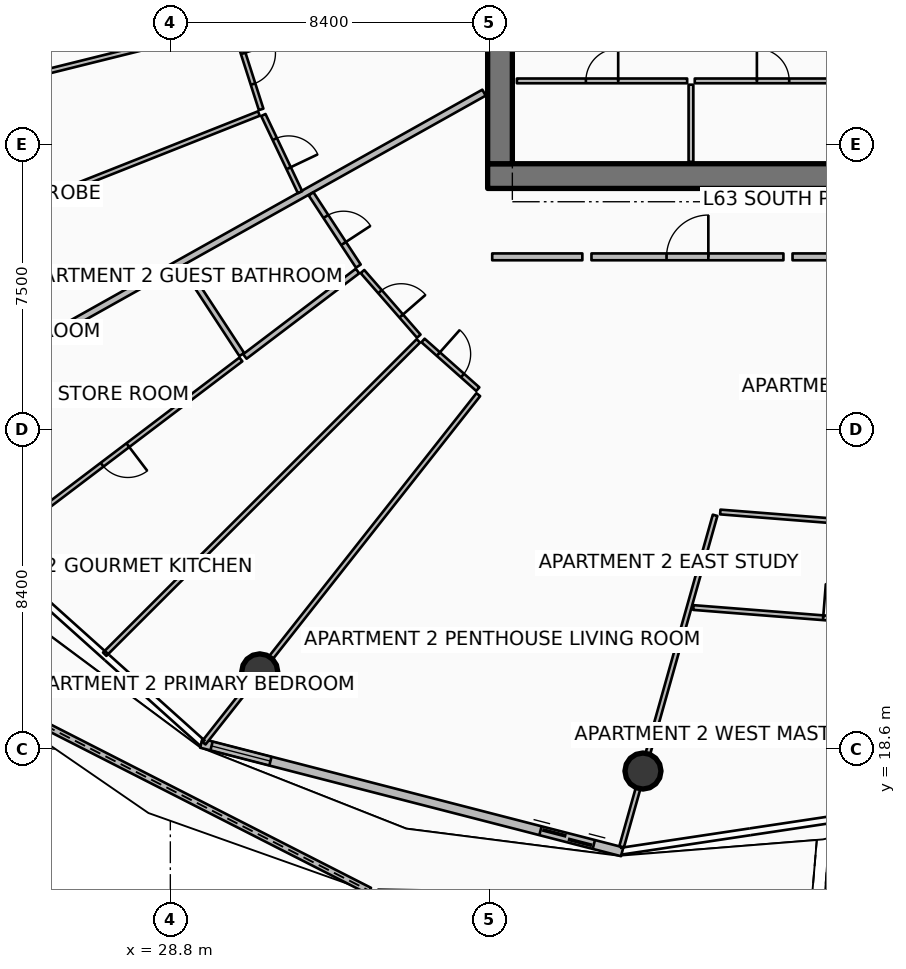
"""IFC4 building model, lengths in metres.
Left out: names, types, materials, properties, quantities, classifications, styles, units other than length and angle.
Written with IfcOpenShell. Run it as: python <this file> out.ifc"""

import sys

from ifc_helpers import new_model, si_unit, direction, frame, frame_2d, origin, origin_2d, place, context, subcontext, project, spatial, polyline, rectangle, circle, outline, extrude, element, fill, save


model = new_model("IFC4")
c1 = context("Model", 3, precision=1e-05, world=origin(), true_north=direction((0.0, 1.0)))
c2 = subcontext(c1, "Body", "Model", "MODEL_VIEW")
j1 = project(units=[si_unit("LENGTHUNIT", "METRE"), si_unit("PLANEANGLEUNIT", "RADIAN")], contexts=[c1])
p1 = place(None, origin())
s1 = spatial("IfcSite", under=j1, at=p1, CompositionType="ELEMENT")
p2 = place(p1, origin())
s2 = spatial("IfcBuilding", under=s1, at=p2, CompositionType="ELEMENT")
p3 = place(p2, frame((0.0, 0.0, 252.1)))
s3 = spatial("IfcBuildingStorey", under=s2, at=p3, CompositionType="ELEMENT", Elevation=252.1)
p4 = place(p3, frame((37.15, 33.675, 0.0), z_axis=(0.0, 0.0, 1.0), x_axis=(1.0, 0.0, 0.0)))
e1 = element("IfcWall", 1, at=p4, inside=s3, PredefinedType="SHEAR", context=c2, shape_type="SweptSolid", body=[
    extrude(rectangle(XDim=9.75, YDim=0.65, at=frame_2d((4.875, 0.0))), origin(), (0.0, 0.0, 1.0), 3.85),
])
p5 = place(p3, frame((37.475, 34.0, 0.0), z_axis=(0.0, 0.0, 1.0), x_axis=(0.0, 1.0, 0.0)))
e2 = element("IfcWall", 2, at=p5, inside=s3, PredefinedType="SHEAR", context=c2, shape_type="SweptSolid", body=[
    extrude(rectangle(XDim=16.0, YDim=0.65, at=frame_2d((8.0, 0.0))), origin(), (0.0, 0.0, 1.0), 3.85),
])
for number, where, z_axis, x_axis in (
    (3, (31.153, 20.629, 0.0), (0.0, 0.0, 1.0), (1.0, 0.0, 0.0)),
    (4, (41.237, 18.021, 0.0), (0.0, 0.0, 1.0), (1.0, 0.0, 0.0)),
):
    element("IfcColumn", number, at=place(p3, frame(where, z_axis=z_axis, x_axis=x_axis)), inside=s3, PredefinedType="COLUMN", context=c2, shape_type="SweptSolid", body=[
        extrude(circle(Radius=0.475, at=origin_2d()), origin(), (0.0, 0.0, 1.0), 3.59),
    ])
p6 = place(p3, frame((23.083, 20.454, 0.0), z_axis=(0.0, 0.0, 1.0), x_axis=(0.890886303028, -0.454226369861, 0.0)))
e5 = element("IfcWall", 5, at=p6, inside=s3, PredefinedType="PARAPET", context=c2, shape_type="SweptSolid", body=[
    extrude(outline(polyline([(0.0, 0.0), (12.3, 0.0), (12.3, 1.348), (6.15, 1.562), (0.0, 1.747), (0.0, 0.0)])), frame((0.0, 0.09, 0.0), z_axis=(0.0, -1.0, 0.0), x_axis=(1.0, 0.0, 0.0)), (0.0, 0.0, 1.0), 0.18),
])
p7 = place(p3, frame((46.017, 14.673, 0.0), z_axis=(0.0, 0.0, 1.0), x_axis=(0.976130464401, 0.217184982143, 0.0)))
e6 = element("IfcWall", 6, at=p7, inside=s3, PredefinedType="PARAPET", context=c2, shape_type="SweptSolid", body=[
    extrude(outline(polyline([(0.0, 0.0), (10.258, 0.0), (10.257, 1.348), (5.129, 1.182), (0.0, 1.12), (0.0, 0.0)])), frame((0.0, 0.09, 0.0), z_axis=(0.0, -1.0, 0.0), x_axis=(1.0, 0.0, 0.0)), (0.0, 0.0, 1.0), 0.18),
])
p8 = place(p3, frame((29.614, 18.751, 0.0), z_axis=(0.0, 0.0, 1.0), x_axis=(0.968343758421, -0.249620442927, 0.0)))
e7 = element("IfcWall", 7, at=p8, inside=s3, PredefinedType="SOLIDWALL", context=c2, shape_type="SweptSolid", body=[
    extrude(rectangle(XDim=11.438, YDim=0.24, at=frame_2d((5.719, 0.0))), origin(), (0.0, 0.0, 1.0), 2.54),
])
p9 = place(p8, frame((9.218, 0.0, 0.0)))
e8 = element("IfcOpeningElement", 8, at=p9, cuts=e7, PredefinedType="OPENING", context=c2, shape_type="SweptSolid", body=[
    extrude(rectangle(XDim=1.45, YDim=2.15, at=frame_2d((0.725, 1.075))), frame((0.0, 0.13, 0.0), z_axis=(0.0, -1.0, 0.0), x_axis=(1.0, 0.0, 0.0)), (0.0, 0.0, 1.0), 0.26),
])
p10 = place(p8, frame((0.28, 0.0, 0.65)))
e9 = element("IfcOpeningElement", 9, at=p10, cuts=e7, PredefinedType="OPENING", context=c2, shape_type="SweptSolid", body=[
    extrude(rectangle(XDim=1.6, YDim=1.5, at=frame_2d((0.8, 0.75))), frame((0.0, 0.13, 0.0), z_axis=(0.0, -1.0, 0.0), x_axis=(1.0, 0.0, 0.0)), (0.0, 0.0, 1.0), 0.26),
])
p11 = place(p3, frame((42.5, 34.05, 0.0), z_axis=(0.0, 0.0, 1.0), x_axis=(0.0, 1.0, 0.0)))
e10 = element("IfcWall", 10, at=p11, inside=s3, PredefinedType="PARTITIONING", context=c2, shape_type="SweptSolid", body=[
    extrude(rectangle(XDim=2.03, YDim=0.125, at=frame_2d((1.015, 0.0))), origin(), (0.0, 0.0, 1.0), 3.03),
])
p12 = place(p3, frame((37.92, 36.18, 0.0), z_axis=(0.0, 0.0, 1.0), x_axis=(1.0, 0.0, 0.0)))
e11 = element("IfcWall", 11, at=p12, inside=s3, PredefinedType="PARTITIONING", context=c2, shape_type="SweptSolid", body=[
    extrude(rectangle(XDim=4.48, YDim=0.125, at=frame_2d((2.24, 0.0))), origin(), (0.0, 0.0, 1.0), 3.03),
])
p13 = place(p12, frame((1.815, 0.0, 0.0)))
e12 = element("IfcOpeningElement", 12, at=p13, cuts=e11, PredefinedType="OPENING", context=c2, shape_type="SweptSolid", body=[
    extrude(rectangle(XDim=0.85, YDim=2.06, at=frame_2d((0.425, 1.03))), frame((0.0, 0.073, 0.0), z_axis=(0.0, -1.0, 0.0), x_axis=(1.0, 0.0, 0.0)), (0.0, 0.0, 1.0), 0.145),
])
p14 = place(p3, frame((42.6, 36.18, 0.0), z_axis=(0.0, 0.0, 1.0), x_axis=(1.0, 0.0, 0.0)))
e13 = element("IfcWall", 13, at=p14, inside=s3, PredefinedType="PARTITIONING", context=c2, shape_type="SweptSolid", body=[
    extrude(rectangle(XDim=4.12, YDim=0.125, at=frame_2d((2.06, 0.0))), origin(), (0.0, 0.0, 1.0), 3.03),
])
p15 = place(p14, frame((1.635, 0.0, 0.0)))
e14 = element("IfcOpeningElement", 14, at=p15, cuts=e13, PredefinedType="OPENING", context=c2, shape_type="SweptSolid", body=[
    extrude(rectangle(XDim=0.85, YDim=2.06, at=frame_2d((0.425, 1.03))), frame((0.0, 0.073, 0.0), z_axis=(0.0, -1.0, 0.0), x_axis=(1.0, 0.0, 0.0)), (0.0, 0.0, 1.0), 0.145),
])
p16 = place(p3, frame((37.054, 35.87, 0.0), z_axis=(0.0, 0.0, 1.0), x_axis=(-0.872490186067, -0.488631635506, 0.0)))
e15 = element("IfcWall", 15, at=p16, inside=s3, PredefinedType="PARTITIONING", context=c2, shape_type="SweptSolid", body=[
    extrude(rectangle(XDim=17.884, YDim=0.18, at=frame_2d((8.942, 0.0))), origin(), (0.0, 0.0, 1.0), 2.957),
])
p17 = place(p3, frame((30.391, 37.626, 0.0), z_axis=(0.0, 0.0, 1.0), x_axis=(-0.970503640625, -0.24108646485, 0.0)))
e16 = element("IfcWall", 16, at=p17, inside=s3, PredefinedType="PARTITIONING", context=c2, shape_type="SweptSolid", body=[
    extrude(rectangle(XDim=11.775, YDim=0.125, at=frame_2d((5.888, 0.0))), origin(), (0.0, 0.0, 1.0), 3.03),
])
p18 = place(p3, frame((31.13, 35.321, 0.0), z_axis=(0.0, 0.0, 1.0), x_axis=(-0.929773898428, -0.368131087796, 0.0)))
e17 = element("IfcWall", 17, at=p18, inside=s3, PredefinedType="PARTITIONING", context=c2, shape_type="SweptSolid", body=[
    extrude(rectangle(XDim=11.76, YDim=0.125, at=frame_2d((5.88, 0.0))), origin(), (0.0, 0.0, 1.0), 3.03),
])
p19 = place(p3, frame((30.503, 37.571, 0.0), z_axis=(0.0, 0.0, 1.0), x_axis=(0.305327243998, -0.952247485727, 0.0)))
e18 = element("IfcWall", 18, at=p19, inside=s3, PredefinedType="PARTITIONING", context=c2, shape_type="SweptSolid", body=[
    extrude(rectangle(XDim=2.249, YDim=0.125, at=frame_2d((1.124, 0.0))), origin(), (0.0, 0.0, 1.0), 3.03),
])
p20 = place(p19, frame((0.699, 0.0, 0.0)))
e19 = element("IfcOpeningElement", 19, at=p20, cuts=e18, PredefinedType="OPENING", context=c2, shape_type="SweptSolid", body=[
    extrude(rectangle(XDim=0.85, YDim=2.06, at=frame_2d((0.425, 1.03))), frame((0.0, 0.073, 0.0), z_axis=(0.0, -1.0, 0.0), x_axis=(1.0, 0.0, 0.0)), (0.0, 0.0, 1.0), 0.145),
])
p21 = place(p3, frame((31.248, 35.281, 0.0), z_axis=(0.0, 0.0, 1.0), x_axis=(0.429406696771, -0.903111227241, 0.0)))
e20 = element("IfcWall", 20, at=p21, inside=s3, PredefinedType="PARTITIONING", context=c2, shape_type="SweptSolid", body=[
    extrude(rectangle(XDim=2.249, YDim=0.125, at=frame_2d((1.124, 0.0))), origin(), (0.0, 0.0, 1.0), 2.957),
])
p22 = place(p21, frame((0.699, 0.0, 0.0)))
e21 = element("IfcOpeningElement", 21, at=p22, cuts=e20, PredefinedType="OPENING", context=c2, shape_type="SweptSolid", body=[
    extrude(rectangle(XDim=0.85, YDim=2.06, at=frame_2d((0.425, 1.03))), frame((0.0, 0.073, 0.0), z_axis=(0.0, -1.0, 0.0), x_axis=(1.0, 0.0, 0.0)), (0.0, 0.0, 1.0), 0.145),
])
p23 = place(p3, frame((39.882, 31.55, 0.0), z_axis=(0.0, 0.0, 1.0), x_axis=(1.0, 0.0, 0.0)))
e22 = element("IfcWall", 22, at=p23, inside=s3, PredefinedType="PARTITIONING", context=c2, shape_type="SweptSolid", body=[
    extrude(rectangle(XDim=5.051, YDim=0.18, at=frame_2d((2.525, 0.0))), origin(), (0.0, 0.0, 1.0), 2.957),
])
p24 = place(p23, frame((1.975, 0.0, 0.0)))
e23 = element("IfcOpeningElement", 23, at=p24, cuts=e22, PredefinedType="OPENING", context=c2, shape_type="SweptSolid", body=[
    extrude(rectangle(XDim=1.1, YDim=2.1, at=frame_2d((0.55, 1.05))), frame((0.0, 0.1, 0.0), z_axis=(0.0, -1.0, 0.0), x_axis=(1.0, 0.0, 0.0)), (0.0, 0.0, 1.0), 0.2),
])
p25 = place(p3, frame((37.27, 31.55, 0.0), z_axis=(0.0, 0.0, 1.0), x_axis=(1.0, 0.0, 0.0)))
e24 = element("IfcWall", 24, at=p25, inside=s3, PredefinedType="PARTITIONING", context=c2, shape_type="SweptSolid", body=[
    extrude(rectangle(XDim=2.372, YDim=0.18, at=frame_2d((1.186, 0.0))), origin(), (0.0, 0.0, 1.0), 2.957),
])
p26 = place(p3, frame((36.903, 27.924, 0.0), z_axis=(0.0, 0.0, 1.0), x_axis=(-0.619090039254, -0.785320013304, 0.0)))
e25 = element("IfcWall", 25, at=p26, inside=s3, PredefinedType="PARTITIONING", context=c2, shape_type="SweptSolid", body=[
    extrude(rectangle(XDim=11.672, YDim=0.125, at=frame_2d((5.836, 0.0))), origin(), (0.0, 0.0, 1.0), 2.957),
])
p27 = place(p3, frame((32.503, 33.207, 0.0), z_axis=(0.0, 0.0, 1.0), x_axis=(0.54776176335, -0.836634358972, 0.0)))
e26 = element("IfcWall", 26, at=p27, inside=s3, PredefinedType="PARTITIONING", context=c2, shape_type="SweptSolid", body=[
    extrude(rectangle(XDim=2.272, YDim=0.15, at=frame_2d((1.136, 0.0))), origin(), (0.0, 0.0, 1.0), 2.957),
])
p28 = place(p27, frame((0.711, 0.0, 0.0)))
e27 = element("IfcOpeningElement", 27, at=p28, cuts=e26, PredefinedType="OPENING", context=c2, shape_type="SweptSolid", body=[
    extrude(rectangle(XDim=0.85, YDim=2.06, at=frame_2d((0.425, 1.03))), frame((0.0, 0.085, 0.0), z_axis=(0.0, -1.0, 0.0), x_axis=(1.0, 0.0, 0.0)), (0.0, 0.0, 1.0), 0.17),
])
p29 = place(p3, frame((29.144, 31.326, 0.0), z_axis=(0.0, 0.0, 1.0), x_axis=(0.547727893033, -0.836656533587, 0.0)))
e28 = element("IfcWall", 28, at=p29, inside=s3, PredefinedType="PARTITIONING", context=c2, shape_type="SweptSolid", body=[
    extrude(rectangle(XDim=2.804, YDim=0.15, at=frame_2d((1.402, 0.0))), origin(), (0.0, 0.0, 1.0), 2.957),
])
p30 = place(p3, frame((33.725, 31.177, 0.0), z_axis=(0.0, 0.0, 1.0), x_axis=(-0.796854692537, -0.604171001441, 0.0)))
e29 = element("IfcWall", 29, at=p30, inside=s3, PredefinedType="PARTITIONING", context=c2, shape_type="SweptSolid", body=[
    extrude(rectangle(XDim=3.72, YDim=0.15, at=frame_2d((1.86, 0.0))), origin(), (0.0, 0.0, 1.0), 3.03),
])
p31 = place(p3, frame((30.657, 28.851, 0.0), z_axis=(0.0, 0.0, 1.0), x_axis=(-0.796843780875, -0.604185392807, 0.0)))
e30 = element("IfcWall", 30, at=p31, inside=s3, PredefinedType="PARTITIONING", context=c2, shape_type="SweptSolid", body=[
    extrude(rectangle(XDim=8.318, YDim=0.125, at=frame_2d((4.159, 0.0))), origin(), (0.0, 0.0, 1.0), 3.03),
])
p32 = place(p31, frame((3.734, 0.0, 0.0)))
e31 = element("IfcOpeningElement", 31, at=p32, cuts=e30, PredefinedType="OPENING", context=c2, shape_type="SweptSolid", body=[
    extrude(rectangle(XDim=0.85, YDim=2.06, at=frame_2d((0.425, 1.03))), frame((0.0, 0.073, 0.0), z_axis=(0.0, -1.0, 0.0), x_axis=(1.0, 0.0, 0.0)), (0.0, 0.0, 1.0), 0.145),
])
p33 = place(p3, frame((35.326, 29.34, 0.0), z_axis=(0.0, 0.0, 1.0), x_axis=(-0.707472916484, -0.706740456208, 0.0)))
e32 = element("IfcWall", 32, at=p33, inside=s3, PredefinedType="PARTITIONING", context=c2, shape_type="SweptSolid", body=[
    extrude(rectangle(XDim=11.666, YDim=0.125, at=frame_2d((5.833, 0.0))), origin(), (0.0, 0.0, 1.0), 3.03),
])
p34 = place(p3, frame((33.856, 31.163, 0.0), z_axis=(0.0, 0.0, 1.0), x_axis=(0.656985315096, -0.753903372952, 0.0)))
e33 = element("IfcWall", 33, at=p34, inside=s3, PredefinedType="PARTITIONING", context=c2, shape_type="SweptSolid", body=[
    extrude(rectangle(XDim=2.255, YDim=0.125, at=frame_2d((1.127, 0.0))), origin(), (0.0, 0.0, 1.0), 3.03),
])
p35 = place(p34, frame((0.702, 0.0, 0.0)))
e34 = element("IfcOpeningElement", 34, at=p35, cuts=e33, PredefinedType="OPENING", context=c2, shape_type="SweptSolid", body=[
    extrude(rectangle(XDim=0.85, YDim=2.06, at=frame_2d((0.425, 1.03))), frame((0.0, 0.073, 0.0), z_axis=(0.0, -1.0, 0.0), x_axis=(1.0, 0.0, 0.0)), (0.0, 0.0, 1.0), 0.145),
])
p36 = place(p3, frame((35.45, 29.35, 0.0), z_axis=(0.0, 0.0, 1.0), x_axis=(0.747360411924, -0.664418854857, 0.0)))
e35 = element("IfcWall", 35, at=p36, inside=s3, PredefinedType="PARTITIONING", context=c2, shape_type="SweptSolid", body=[
    extrude(rectangle(XDim=1.928, YDim=0.125, at=frame_2d((0.964, 0.0))), origin(), (0.0, 0.0, 1.0), 2.957),
])
p37 = place(p36, frame((0.539, 0.0, 0.0)))
e36 = element("IfcOpeningElement", 36, at=p37, cuts=e35, PredefinedType="OPENING", context=c2, shape_type="SweptSolid", body=[
    extrude(rectangle(XDim=0.85, YDim=2.06, at=frame_2d((0.425, 1.03))), frame((0.0, 0.073, 0.0), z_axis=(0.0, -1.0, 0.0), x_axis=(1.0, 0.0, 0.0)), (0.0, 0.0, 1.0), 0.145),
])
p38 = place(p3, frame((45.173, 31.55, 0.0), z_axis=(0.0, 0.0, 1.0), x_axis=(1.0, 0.0, 0.0)))
e37 = element("IfcWall", 37, at=p38, inside=s3, PredefinedType="PARTITIONING", context=c2, shape_type="SweptSolid", body=[
    extrude(rectangle(XDim=3.944, YDim=0.18, at=frame_2d((1.972, 0.0))), origin(), (0.0, 0.0, 1.0), 2.957),
])
p39 = place(p3, frame((43.135, 24.749, 0.0), z_axis=(0.0, 0.0, 1.0), x_axis=(-0.271445445258, -0.962453827593, 0.0)))
e38 = element("IfcWall", 38, at=p39, inside=s3, PredefinedType="PARTITIONING", context=c2, shape_type="SweptSolid", body=[
    extrude(rectangle(XDim=9.061, YDim=0.125, at=frame_2d((4.53, 0.0))), origin(), (0.0, 0.0, 1.0), 2.957),
])
p40 = place(p3, frame((43.271, 24.837, 0.0), z_axis=(0.0, 0.0, 1.0), x_axis=(0.996915339886, -0.078484425849, 0.0)))
e39 = element("IfcWall", 39, at=p40, inside=s3, PredefinedType="PARTITIONING", context=c2, shape_type="SweptSolid", body=[
    extrude(rectangle(XDim=6.735, YDim=0.125, at=frame_2d((3.367, 0.0))), origin(), (0.0, 0.0, 1.0), 2.957),
])
p41 = place(p40, frame((2.917, 0.0, 0.0)))
e40 = element("IfcOpeningElement", 40, at=p41, cuts=e39, PredefinedType="OPENING", context=c2, shape_type="SweptSolid", body=[
    extrude(rectangle(XDim=0.9, YDim=2.08, at=frame_2d((0.45, 1.04))), frame((0.0, 0.073, 0.0), z_axis=(0.0, -1.0, 0.0), x_axis=(1.0, 0.0, 0.0)), (0.0, 0.0, 1.0), 0.145),
])
p42 = place(p3, frame((42.562, 22.323, 0.0), z_axis=(0.0, 0.0, 1.0), x_axis=(0.996916778928, -0.078466144881, 0.0)))
e41 = element("IfcWall", 41, at=p42, inside=s3, PredefinedType="PARTITIONING", context=c2, shape_type="SweptSolid", body=[
    extrude(rectangle(XDim=7.754, YDim=0.125, at=frame_2d((3.877, 0.0))), origin(), (0.0, 0.0, 1.0), 2.957),
])
p43 = place(p42, frame((3.427, 0.0, 0.0)))
e42 = element("IfcOpeningElement", 42, at=p43, cuts=e41, PredefinedType="OPENING", context=c2, shape_type="SweptSolid", body=[
    extrude(rectangle(XDim=0.9, YDim=2.08, at=frame_2d((0.45, 1.04))), frame((0.0, 0.073, 0.0), z_axis=(0.0, -1.0, 0.0), x_axis=(1.0, 0.0, 0.0)), (0.0, 0.0, 1.0), 0.145),
])
p44 = place(p9, origin())
e43 = element("IfcDoor", 43, at=p44, inside=s3, OperationType="DOUBLE_DOOR_SLIDING", PredefinedType="DOOR", context=c2, shape_type="SweptSolid", body=[
    extrude(rectangle(XDim=1.45, YDim=2.15, at=frame_2d((0.725, 1.075))), frame((0.0, 0.025, 0.0), z_axis=(0.0, -1.0, 0.0), x_axis=(1.0, 0.0, 0.0)), (0.0, 0.0, 1.0), 0.05),
])
fill(e8, e43)
p45 = place(p10, origin())
e44 = element("IfcWindow", 44, at=p45, inside=s3, PartitioningType="SINGLE_PANEL", PredefinedType="WINDOW", context=c2, shape_type="SweptSolid", body=[
    extrude(rectangle(XDim=1.6, YDim=1.5, at=frame_2d((0.8, 0.75))), frame((0.0, 0.03, 0.0), z_axis=(0.0, -1.0, 0.0), x_axis=(1.0, 0.0, 0.0)), (0.0, 0.0, 1.0), 0.06),
])
fill(e9, e44)
p46 = place(p13, origin())
e45 = element("IfcDoor", 45, at=p46, inside=s3, OperationType="SINGLE_SWING_RIGHT", PredefinedType="DOOR", context=c2, shape_type="SweptSolid", body=[
    extrude(rectangle(XDim=0.85, YDim=2.06, at=frame_2d((0.425, 1.03))), frame((0.0, 0.025, 0.0), z_axis=(0.0, -1.0, 0.0), x_axis=(1.0, 0.0, 0.0)), (0.0, 0.0, 1.0), 0.05),
])
fill(e12, e45)
p47 = place(p15, origin())
e46 = element("IfcDoor", 46, at=p47, inside=s3, OperationType="SINGLE_SWING_LEFT", PredefinedType="DOOR", context=c2, shape_type="SweptSolid", body=[
    extrude(rectangle(XDim=0.85, YDim=2.06, at=frame_2d((0.425, 1.03))), frame((0.0, 0.025, 0.0), z_axis=(0.0, -1.0, 0.0), x_axis=(1.0, 0.0, 0.0)), (0.0, 0.0, 1.0), 0.05),
])
fill(e14, e46)
p48 = place(p20, origin())
e47 = element("IfcDoor", 47, at=p48, inside=s3, OperationType="SINGLE_SWING_LEFT", PredefinedType="DOOR", context=c2, shape_type="SweptSolid", body=[
    extrude(rectangle(XDim=0.85, YDim=2.06, at=frame_2d((0.425, 1.03))), frame((0.0, 0.025, 0.0), z_axis=(0.0, -1.0, 0.0), x_axis=(1.0, 0.0, 0.0)), (0.0, 0.0, 1.0), 0.05),
])
fill(e19, e47)
p49 = place(p22, origin())
e48 = element("IfcDoor", 48, at=p49, inside=s3, OperationType="SINGLE_SWING_RIGHT", PredefinedType="DOOR", context=c2, shape_type="SweptSolid", body=[
    extrude(rectangle(XDim=0.85, YDim=2.06, at=frame_2d((0.425, 1.03))), frame((0.0, 0.025, 0.0), z_axis=(0.0, -1.0, 0.0), x_axis=(1.0, 0.0, 0.0)), (0.0, 0.0, 1.0), 0.05),
])
fill(e21, e48)
p50 = place(p24, origin())
e49 = element("IfcDoor", 49, at=p50, inside=s3, OperationType="SINGLE_SWING_RIGHT", PredefinedType="DOOR", context=c2, shape_type="SweptSolid", body=[
    extrude(rectangle(XDim=1.1, YDim=2.1, at=frame_2d((0.55, 1.05))), frame((0.0, 0.025, 0.0), z_axis=(0.0, -1.0, 0.0), x_axis=(1.0, 0.0, 0.0)), (0.0, 0.0, 1.0), 0.05),
])
fill(e23, e49)
p51 = place(p28, origin())
e50 = element("IfcDoor", 50, at=p51, inside=s3, OperationType="SINGLE_SWING_RIGHT", PredefinedType="DOOR", context=c2, shape_type="SweptSolid", body=[
    extrude(rectangle(XDim=0.85, YDim=2.06, at=frame_2d((0.425, 1.03))), frame((0.0, 0.025, 0.0), z_axis=(0.0, -1.0, 0.0), x_axis=(1.0, 0.0, 0.0)), (0.0, 0.0, 1.0), 0.05),
])
fill(e27, e50)
p52 = place(p32, origin())
e51 = element("IfcDoor", 51, at=p52, inside=s3, OperationType="SINGLE_SWING_LEFT", PredefinedType="DOOR", context=c2, shape_type="SweptSolid", body=[
    extrude(rectangle(XDim=0.85, YDim=2.06, at=frame_2d((0.425, 1.03))), frame((0.0, 0.025, 0.0), z_axis=(0.0, -1.0, 0.0), x_axis=(1.0, 0.0, 0.0)), (0.0, 0.0, 1.0), 0.05),
])
fill(e31, e51)
p53 = place(p35, origin())
e52 = element("IfcDoor", 52, at=p53, inside=s3, OperationType="SINGLE_SWING_RIGHT", PredefinedType="DOOR", context=c2, shape_type="SweptSolid", body=[
    extrude(rectangle(XDim=0.85, YDim=2.06, at=frame_2d((0.425, 1.03))), frame((0.0, 0.025, 0.0), z_axis=(0.0, -1.0, 0.0), x_axis=(1.0, 0.0, 0.0)), (0.0, 0.0, 1.0), 0.05),
])
fill(e34, e52)
p54 = place(p37, origin())
e53 = element("IfcDoor", 53, at=p54, inside=s3, OperationType="SINGLE_SWING_LEFT", PredefinedType="DOOR", context=c2, shape_type="SweptSolid", body=[
    extrude(rectangle(XDim=0.85, YDim=2.06, at=frame_2d((0.425, 1.03))), frame((0.0, 0.025, 0.0), z_axis=(0.0, -1.0, 0.0), x_axis=(1.0, 0.0, 0.0)), (0.0, 0.0, 1.0), 0.05),
])
fill(e36, e53)
p55 = place(p43, origin())
e54 = element("IfcDoor", 54, at=p55, inside=s3, OperationType="SINGLE_SWING_LEFT", PredefinedType="DOOR", context=c2, shape_type="SweptSolid", body=[
    extrude(rectangle(XDim=0.9, YDim=2.08, at=frame_2d((0.45, 1.04))), frame((0.0, 0.025, 0.0), z_axis=(0.0, -1.0, 0.0), x_axis=(1.0, 0.0, 0.0)), (0.0, 0.0, 1.0), 0.05),
])
fill(e42, e54)
save(model, sys.argv[1])
